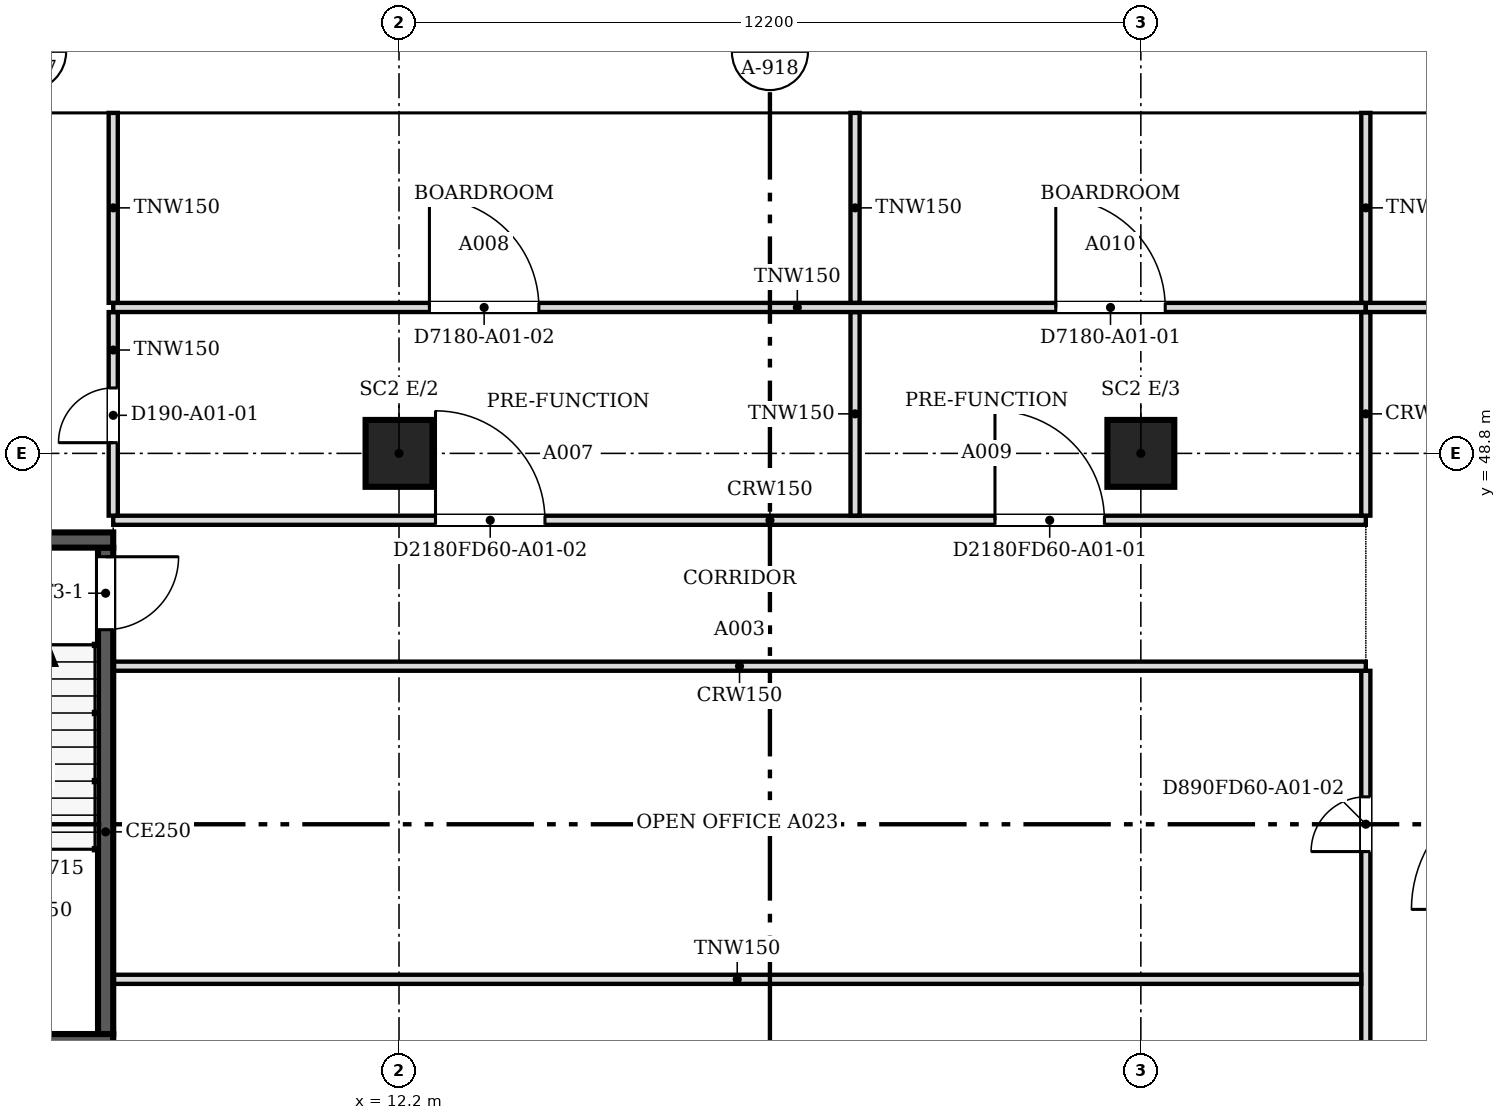
"""IFC4 building model, lengths in metres.
Left out: names, types, materials, properties, quantities, classifications, styles, units other than length and angle.
Written with IfcOpenShell. Run it as: python <this file> out.ifc"""

import sys

from ifc_helpers import new_model, si_unit, direction, frame, frame_2d, origin, origin_2d, place, context, subcontext, project, spatial, polyline, rectangle, outline, extrude, faceted_brep, source, transform, mapped, element, fill, save


model = new_model("IFC4")
c1 = context("Model", 3, precision=1e-05, world=origin(), true_north=direction((0.0, 1.0)))
c2 = subcontext(c1, "Body", "Model", "MODEL_VIEW")
j1 = project(units=[si_unit("LENGTHUNIT", "METRE"), si_unit("PLANEANGLEUNIT", "RADIAN")], contexts=[c1])
p1 = place(None, origin())
s1 = spatial("IfcSite", under=j1, at=p1, CompositionType="ELEMENT")
p2 = place(p1, origin())
s2 = spatial("IfcBuilding", under=s1, at=p2, CompositionType="ELEMENT")
p3 = place(p2, frame((0.0, 0.0, 21.3)))
s3 = spatial("IfcBuildingStorey", under=s2, at=p3, CompositionType="ELEMENT", Elevation=21.3)
for number, where, z_axis, x_axis in (
    (1, (12.2, 48.8, 0.0), (0.0, 0.0, 1.0), (1.0, 0.0, 0.0)),
    (2, (24.4, 48.8, 0.0), (0.0, 0.0, 1.0), (1.0, 0.0, 0.0)),
):
    element("IfcColumn", number, at=place(p3, frame(where, z_axis=z_axis, x_axis=x_axis)), inside=s3, PredefinedType="COLUMN", context=c2, shape_type="SweptSolid", body=[
        extrude(rectangle(XDim=1.1, YDim=1.1, at=origin_2d()), origin(), (0.0, 0.0, 1.0), 4.3),
    ])
m1 = source(origin(), c2, "Body", "SweptSolid", [
    extrude(outline(polyline([(3.05, 0.0), (6.1, 4.5), (3.05, 9.0), (0.0, 4.5), (3.05, 0.0)])), frame((0.0, 0.25, 0.0), z_axis=(0.0, -1.0, 0.0), x_axis=(1.0, 0.0, 0.0)), (0.0, 0.0, 1.0), 0.5),
])
p4 = place(p3, frame((30.5, 54.65, -4.5), z_axis=(0.0, 0.0, 1.0), x_axis=(-1.0, 0.0, 0.0)))
e3 = element("IfcWall", 3, at=p4, inside=s3, PredefinedType="SOLIDWALL", context=c2, shape_type="MappedRepresentation", body=[
    mapped(m1, transform((0.0, 0.0, 0.0), scale=1.0)),
])
m2 = source(origin(), c2, "Body", "SweptSolid", [
    extrude(outline(polyline([(3.05, 0.446), (5.798, 4.5), (3.05, 8.554), (0.302, 4.5), (3.05, 0.446)])), frame((0.0, 0.26, 0.0), z_axis=(0.0, -1.0, 0.0), x_axis=(1.0, 0.0, 0.0)), (0.0, 0.0, 1.0), 0.52),
])
p5 = place(p4, origin())
e4 = element("IfcOpeningElement", 4, at=p5, cuts=e3, PredefinedType="OPENING", context=c2, shape_type="MappedRepresentation", body=[
    mapped(m2, transform((0.0, 0.0, 0.0), scale=1.0)),
])
m3 = source(origin(), c2, "Body", "Brep", [
    faceted_brep([(3.05, -0.25, 0.0), (6.1, -0.25, 4.5), (6.1, -0.25, 4.5), (3.05, -0.25, 9.0), (0.0, -0.25, 4.5), (0.0, 0.25, 4.5), (3.05, 0.25, 9.0), (6.1, 0.25, 4.5), (6.1, 0.25, 4.5), (3.05, 0.25, 0.0)], [[[0, 1, 2, 3, 4]], [[5, 6, 7, 8, 9]], [[9, 8, 1, 0]], [[7, 6, 3, 2]], [[6, 5, 4, 3]], [[5, 9, 0, 4]], [[1, 8, 7, 2]]]),
])
p6 = place(p3, frame((24.4, 54.65, -4.5), z_axis=(0.0, 0.0, 1.0), x_axis=(-1.0, 0.0, 0.0)))
e5 = element("IfcWall", 5, at=p6, inside=s3, PredefinedType="SOLIDWALL", context=c2, shape_type="MappedRepresentation", body=[
    mapped(m3, transform((0.0, 0.0, 0.0), scale=1.0)),
])
p7 = place(p6, origin())
e6 = element("IfcOpeningElement", 6, at=p7, cuts=e5, PredefinedType="OPENING", context=c2, shape_type="MappedRepresentation", body=[
    mapped(m2, transform((0.0, 0.0, 0.0), scale=1.0)),
])
p8 = place(p3, frame((18.3, 54.65, -4.5), z_axis=(0.0, 0.0, 1.0), x_axis=(-1.0, 0.0, 0.0)))
e7 = element("IfcWall", 7, at=p8, inside=s3, PredefinedType="SOLIDWALL", context=c2, shape_type="MappedRepresentation", body=[
    mapped(m1, transform((0.0, 0.0, 0.0), scale=1.0)),
])
p9 = place(p8, origin())
e8 = element("IfcOpeningElement", 8, at=p9, cuts=e7, PredefinedType="OPENING", context=c2, shape_type="MappedRepresentation", body=[
    mapped(m2, transform((0.0, 0.0, 0.0), scale=1.0)),
])
m4 = source(origin(), c2, "Body", "Brep", [
    faceted_brep([(3.05, -0.25, 0.0), (6.053, -0.25, 4.5), (3.05, -0.25, 9.0), (0.0, -0.25, 4.5), (0.0, 0.25, 4.5), (3.05, 0.25, 9.0), (6.007, 0.25, 4.57), (6.007, 0.25, 4.43), (3.05, 0.25, 0.0), (6.053, 0.0, 4.5)], [[[0, 1, 2, 3]], [[4, 5, 6, 7, 8]], [[8, 7, 9, 1, 0]], [[6, 5, 2, 1, 9]], [[5, 4, 3, 2]], [[4, 8, 0, 3]], [[9, 7, 6]]]),
])
p10 = place(p3, frame((12.2, 54.65, -4.5), z_axis=(0.0, 0.0, 1.0), x_axis=(-1.0, 0.0, 0.0)))
e9 = element("IfcWall", 9, at=p10, inside=s3, PredefinedType="SOLIDWALL", context=c2, shape_type="MappedRepresentation", body=[
    mapped(m4, transform((0.0, 0.0, 0.0), scale=1.0)),
])
m5 = source(origin(), c2, "Body", "SweptSolid", [
    extrude(outline(polyline([(3.048, 0.448), (5.753, 4.5), (3.048, 8.552), (0.302, 4.5), (3.048, 0.448)])), frame((0.0, 0.26, 0.0), z_axis=(0.0, -1.0, 0.0), x_axis=(1.0, 0.0, 0.0)), (0.0, 0.0, 1.0), 0.52),
])
p11 = place(p10, origin())
e10 = element("IfcOpeningElement", 10, at=p11, cuts=e9, PredefinedType="OPENING", context=c2, shape_type="MappedRepresentation", body=[
    mapped(m5, transform((0.0, 0.0, 0.0), scale=1.0)),
])
m6 = source(origin(), c2, "Body", "SweptSolid", [
    extrude(outline(polyline([(3.05, 0.0), (6.1, 4.5), (0.0, 4.5), (3.05, 0.0)])), frame((0.0, 0.25, 0.0), z_axis=(0.0, -1.0, 0.0), x_axis=(1.0, 0.0, 0.0)), (0.0, 0.0, 1.0), 0.5),
])
p12 = place(p3, frame((33.55, 54.65, 0.0), z_axis=(0.0, 0.0, 1.0), x_axis=(-1.0, 0.0, 0.0)))
e11 = element("IfcWall", 11, at=p12, inside=s3, PredefinedType="SOLIDWALL", context=c2, shape_type="MappedRepresentation", body=[
    mapped(m6, transform((0.0, 0.0, 0.0), scale=1.0)),
])
m7 = source(origin(), c2, "Body", "SweptSolid", [
    extrude(outline(polyline([(3.05, 0.446), (5.629, 4.25), (0.471, 4.25), (3.05, 0.446)])), frame((0.0, 0.26, 0.0), z_axis=(0.0, -1.0, 0.0), x_axis=(1.0, 0.0, 0.0)), (0.0, 0.0, 1.0), 0.52),
])
p13 = place(p12, origin())
e12 = element("IfcOpeningElement", 12, at=p13, cuts=e11, PredefinedType="OPENING", context=c2, shape_type="MappedRepresentation", body=[
    mapped(m7, transform((0.0, 0.0, 0.0), scale=1.0)),
])
m8 = source(origin(), c2, "Body", "Brep", [
    faceted_brep([(3.05, -0.25, 0.0), (6.1, -0.25, 4.5), (6.1, -0.25, 4.5), (0.0, -0.25, 4.5), (0.0, 0.25, 4.5), (6.1, 0.25, 4.5), (6.1, 0.25, 4.5), (3.05, 0.25, 0.0)], [[[0, 1, 2, 3]], [[4, 5, 6, 7]], [[7, 6, 1, 0]], [[5, 4, 3, 2]], [[4, 7, 0, 3]], [[1, 6, 5, 2]]]),
])
p14 = place(p3, frame((27.45, 54.65, 0.0), z_axis=(0.0, 0.0, 1.0), x_axis=(-1.0, 0.0, 0.0)))
e13 = element("IfcWall", 13, at=p14, inside=s3, PredefinedType="SOLIDWALL", context=c2, shape_type="MappedRepresentation", body=[
    mapped(m8, transform((0.0, 0.0, 0.0), scale=1.0)),
])
p15 = place(p14, origin())
e14 = element("IfcOpeningElement", 14, at=p15, cuts=e13, PredefinedType="OPENING", context=c2, shape_type="MappedRepresentation", body=[
    mapped(m7, transform((0.0, 0.0, 0.0), scale=1.0)),
])
p16 = place(p3, frame((21.35, 54.65, 0.0), z_axis=(0.0, 0.0, 1.0), x_axis=(-1.0, 0.0, 0.0)))
e15 = element("IfcWall", 15, at=p16, inside=s3, PredefinedType="SOLIDWALL", context=c2, shape_type="MappedRepresentation", body=[
    mapped(m6, transform((0.0, 0.0, 0.0), scale=1.0)),
])
p17 = place(p16, origin())
e16 = element("IfcOpeningElement", 16, at=p17, cuts=e15, PredefinedType="OPENING", context=c2, shape_type="MappedRepresentation", body=[
    mapped(m7, transform((0.0, 0.0, 0.0), scale=1.0)),
])
p18 = place(p3, frame((15.25, 54.65, 0.0), z_axis=(0.0, 0.0, 1.0), x_axis=(-1.0, 0.0, 0.0)))
e17 = element("IfcWall", 17, at=p18, inside=s3, PredefinedType="SOLIDWALL", context=c2, shape_type="MappedRepresentation", body=[
    mapped(m6, transform((0.0, 0.0, 0.0), scale=1.0)),
])
p19 = place(p18, origin())
e18 = element("IfcOpeningElement", 18, at=p19, cuts=e17, PredefinedType="OPENING", context=c2, shape_type="MappedRepresentation", body=[
    mapped(m7, transform((0.0, 0.0, 0.0), scale=1.0)),
])
m9 = source(origin(), c2, "Body", "Brep", [
    faceted_brep([(3.003, -0.25, 0.0), (3.05, -0.25, 0.071), (3.05, -0.25, 4.5), (0.0, -0.25, 4.5), (0.0, 0.25, 4.5), (2.957, 0.25, 4.5), (2.957, 0.25, 0.07), (3.003, 0.0, 0.0)], [[[0, 1, 2, 3]], [[4, 5, 6]], [[1, 0, 7]], [[5, 4, 3, 2]], [[4, 6, 7, 0, 3]], [[1, 7, 6, 5, 2]]]),
])
p20 = place(p3, frame((9.15, 54.65, 0.0), z_axis=(0.0, 0.0, 1.0), x_axis=(-1.0, 0.0, 0.0)))
e19 = element("IfcWall", 19, at=p20, inside=s3, PredefinedType="SOLIDWALL", context=c2, shape_type="MappedRepresentation", body=[
    mapped(m9, transform((0.0, 0.0, 0.0), scale=1.0)),
])
m10 = source(origin(), c2, "Body", "SweptSolid", [
    extrude(outline(polyline([(2.803, 4.25), (0.468, 4.25), (2.803, 0.75), (2.803, 4.25)])), frame((0.0, 0.26, 0.0), z_axis=(0.0, -1.0, 0.0), x_axis=(1.0, 0.0, 0.0)), (0.0, 0.0, 1.0), 0.52),
])
p21 = place(p20, origin())
e20 = element("IfcOpeningElement", 20, at=p21, cuts=e19, PredefinedType="OPENING", context=c2, shape_type="MappedRepresentation", body=[
    mapped(m10, transform((0.0, 0.0, 0.0), scale=1.0)),
])
for number, where, z_axis, x_axis in (
    (21, (7.5, 39.125, 0.0), (0.0, 0.0, 1.0), (-1.0, 0.0, 0.0)),
    (22, (3.6, 47.375, 0.0), (0.0, 0.0, 1.0), (1.0, 0.0, 0.0)),
):
    element("IfcWall", number, at=place(p3, frame(where, z_axis=z_axis, x_axis=x_axis)), inside=s3, PredefinedType="SOLIDWALL", context=c2, shape_type="SweptSolid", body=[
        extrude(rectangle(XDim=3.9, YDim=0.25, at=frame_2d((1.95, 0.0))), origin(), (0.0, 0.0, 1.0), 4.5),
    ])
p22 = place(p3, frame((7.375, 47.25, 0.0), z_axis=(0.0, 0.0, 1.0), x_axis=(0.0, -1.0, 0.0)))
e23 = element("IfcWall", 23, at=p22, inside=s3, PredefinedType="SOLIDWALL", context=c2, shape_type="SweptSolid", body=[
    extrude(rectangle(XDim=8.0, YDim=0.25, at=frame_2d((4.0, 0.0))), origin(), (0.0, 0.0, 1.0), 4.5),
])
m11 = source(origin(), c2, "Body", "SweptSolid", [
    extrude(rectangle(XDim=1.2, YDim=2.1, at=frame_2d((0.6, 1.05))), frame((0.0, 0.135, 0.0), z_axis=(0.0, -1.0, 0.0), x_axis=(1.0, 0.0, 0.0)), (0.0, 0.0, 1.0), 0.27),
])
p23 = place(p22, frame((0.15, 0.0, 0.0)))
e24 = element("IfcOpeningElement", 24, at=p23, cuts=e23, PredefinedType="OPENING", context=c2, shape_type="MappedRepresentation", body=[
    mapped(m11, transform((0.0, 0.0, 0.0), scale=1.0)),
])
p24 = place(p3, frame((28.1, 18.8, 0.0), z_axis=(0.0, 0.0, 1.0), x_axis=(0.0, 1.0, 0.0)))
e25 = element("IfcWall", 25, at=p24, inside=s3, PredefinedType="PARTITIONING", context=c2, shape_type="SweptSolid", body=[
    extrude(rectangle(XDim=26.424, YDim=0.15, at=frame_2d((13.212, 0.0))), origin(), (0.0, 0.0, 1.0), 3.767),
])
m12 = source(origin(), c2, "Body", "SweptSolid", [
    extrude(rectangle(XDim=0.9, YDim=2.1, at=frame_2d((0.45, 1.05))), frame((0.0, 0.085, 0.0), z_axis=(0.0, -1.0, 0.0), x_axis=(1.0, 0.0, 0.0)), (0.0, 0.0, 1.0), 0.17),
])
p25 = place(p24, frame((3.901, 0.0, 0.0)))
e26 = element("IfcOpeningElement", 26, at=p25, cuts=e25, PredefinedType="OPENING", context=c2, shape_type="MappedRepresentation", body=[
    mapped(m12, transform((0.0, 0.0, 0.0), scale=1.0)),
])
p26 = place(p24, frame((23.451, 0.0, 0.0)))
e27 = element("IfcOpeningElement", 27, at=p26, cuts=e25, PredefinedType="OPENING", context=c2, shape_type="MappedRepresentation", body=[
    mapped(m12, transform((0.0, 0.0, 0.0), scale=1.0)),
])
m13 = source(origin(), c2, "Body", "SweptSolid", [
    extrude(rectangle(XDim=1.0, YDim=2.1, at=frame_2d((0.5, 1.05))), frame((0.0, 0.085, 0.0), z_axis=(0.0, -1.0, 0.0), x_axis=(1.0, 0.0, 0.0)), (0.0, 0.0, 1.0), 0.17),
])
p27 = place(p24, frame((8.4, 0.0, 0.0)))
e28 = element("IfcOpeningElement", 28, at=p27, cuts=e25, PredefinedType="OPENING", context=c2, shape_type="MappedRepresentation", body=[
    mapped(m13, transform((0.0, 0.0, 0.0), scale=1.0)),
])
p28 = place(p24, frame((16.3, 0.0, 0.0)))
e29 = element("IfcOpeningElement", 29, at=p28, cuts=e25, PredefinedType="OPENING", context=c2, shape_type="MappedRepresentation", body=[
    mapped(m12, transform((0.0, 0.0, 0.0), scale=1.0)),
])
p29 = place(p3, frame((7.5, 40.15, 0.0), z_axis=(0.0, 0.0, 1.0), x_axis=(1.0, 0.0, 0.0)))
e30 = element("IfcWall", 30, at=p29, inside=s3, PredefinedType="PARTITIONING", context=c2, shape_type="SweptSolid", body=[
    extrude(rectangle(XDim=20.524, YDim=0.15, at=frame_2d((10.262, 0.0))), origin(), (0.0, 0.0, 1.0), 3.767),
])
p30 = place(p3, frame((7.5, 45.3, 0.0), z_axis=(0.0, 0.0, 1.0), x_axis=(1.0, 0.0, 0.0)))
e31 = element("IfcWall", 31, at=p30, inside=s3, PredefinedType="PARTITIONING", context=c2, shape_type="SweptSolid", body=[
    extrude(rectangle(XDim=20.6, YDim=0.15, at=frame_2d((10.3, 0.0))), origin(), (0.0, 0.0, 1.0), 3.767),
])
p31 = place(p3, frame((7.5, 47.7, 0.0), z_axis=(0.0, 0.0, 1.0), x_axis=(1.0, 0.0, 0.0)))
e32 = element("IfcWall", 32, at=p31, inside=s3, PredefinedType="PARTITIONING", context=c2, shape_type="SweptSolid", body=[
    extrude(rectangle(XDim=20.6, YDim=0.15, at=frame_2d((10.3, 0.0))), origin(), (0.0, 0.0, 1.0), 3.767),
])
m14 = source(origin(), c2, "Body", "SweptSolid", [
    extrude(rectangle(XDim=1.8, YDim=2.1, at=frame_2d((0.9, 1.05))), frame((0.0, 0.085, 0.0), z_axis=(0.0, -1.0, 0.0), x_axis=(1.0, 0.0, 0.0)), (0.0, 0.0, 1.0), 0.17),
])
p32 = place(p31, frame((14.501, 0.0, 0.0)))
e33 = element("IfcOpeningElement", 33, at=p32, cuts=e32, PredefinedType="OPENING", context=c2, shape_type="MappedRepresentation", body=[
    mapped(m14, transform((0.0, 0.0, 0.0), scale=1.0)),
])
p33 = place(p31, frame((5.3, 0.0, 0.0)))
e34 = element("IfcOpeningElement", 34, at=p33, cuts=e32, PredefinedType="OPENING", context=c2, shape_type="MappedRepresentation", body=[
    mapped(m14, transform((0.0, 0.0, 0.0), scale=1.0)),
])
p34 = place(p3, frame((7.5, 47.776, 0.0), z_axis=(0.0, 0.0, 1.0), x_axis=(0.0, 1.0, 0.0)))
e35 = element("IfcWall", 35, at=p34, inside=s3, PredefinedType="PARTITIONING", context=c2, shape_type="SweptSolid", body=[
    extrude(rectangle(XDim=3.348, YDim=0.15, at=frame_2d((1.674, 0.0))), origin(), (0.0, 0.0, 1.0), 3.767),
])
p35 = place(p34, frame((1.2, 0.0, 0.0)))
e36 = element("IfcOpeningElement", 36, at=p35, cuts=e35, PredefinedType="OPENING", context=c2, shape_type="MappedRepresentation", body=[
    mapped(m12, transform((0.0, 0.0, 0.0), scale=1.0)),
])
for number, where, z_axis, x_axis in (
    (37, (19.7, 47.776, 0.0), (0.0, 0.0, 1.0), (0.0, 1.0, 0.0)),
    (38, (28.1, 47.776, 0.0), (0.0, 0.0, 1.0), (0.0, 1.0, 0.0)),
):
    element("IfcWall", number, at=place(p3, frame(where, z_axis=z_axis, x_axis=x_axis)), inside=s3, PredefinedType="PARTITIONING", context=c2, shape_type="SweptSolid", body=[
        extrude(rectangle(XDim=3.348, YDim=0.15, at=frame_2d((1.674, 0.0))), origin(), (0.0, 0.0, 1.0), 3.767),
    ])
p36 = place(p3, frame((7.5, 51.2, 0.0), z_axis=(0.0, 0.0, 1.0), x_axis=(1.0, 0.0, 0.0)))
e39 = element("IfcWall", 39, at=p36, inside=s3, PredefinedType="PARTITIONING", context=c2, shape_type="SweptSolid", body=[
    extrude(rectangle(XDim=20.599, YDim=0.15, at=frame_2d((10.3, 0.0))), origin(), (0.0, 0.0, 1.0), 3.767),
])
p37 = place(p36, frame((15.501, 0.0, 0.0)))
e40 = element("IfcOpeningElement", 40, at=p37, cuts=e39, PredefinedType="OPENING", context=c2, shape_type="MappedRepresentation", body=[
    mapped(m14, transform((0.0, 0.0, 0.0), scale=1.0)),
])
p38 = place(p36, frame((5.2, 0.0, 0.0)))
e41 = element("IfcOpeningElement", 41, at=p38, cuts=e39, PredefinedType="OPENING", context=c2, shape_type="MappedRepresentation", body=[
    mapped(m14, transform((0.0, 0.0, 0.0), scale=1.0)),
])
p39 = place(p3, frame((28.1, 51.2, 0.0), z_axis=(0.0, 0.0, 1.0), x_axis=(1.0, 0.0, 0.0)))
e42 = element("IfcWall", 42, at=p39, inside=s3, PredefinedType="PARTITIONING", context=c2, shape_type="SweptSolid", body=[
    extrude(rectangle(XDim=31.438, YDim=0.15, at=frame_2d((15.719, 0.0))), origin(), (0.0, 0.0, 1.0), 3.767),
])
p40 = place(p39, frame((16.301, 0.0, 0.0)))
e43 = element("IfcOpeningElement", 43, at=p40, cuts=e42, PredefinedType="OPENING", context=c2, shape_type="MappedRepresentation", body=[
    mapped(m12, transform((0.0, 0.0, 0.0), scale=1.0)),
])
p41 = place(p39, frame((25.95, 0.0, 0.0)))
e44 = element("IfcOpeningElement", 44, at=p41, cuts=e42, PredefinedType="OPENING", context=c2, shape_type="MappedRepresentation", body=[
    mapped(m12, transform((0.0, 0.0, 0.0), scale=1.0)),
])
p42 = place(p39, frame((5.6, 0.0, 0.0)))
e45 = element("IfcOpeningElement", 45, at=p42, cuts=e42, PredefinedType="OPENING", context=c2, shape_type="MappedRepresentation", body=[
    mapped(m12, transform((0.0, 0.0, 0.0), scale=1.0)),
])
for number, where, z_axis, x_axis in (
    (46, (7.5, 51.276, 0.0), (0.0, 0.0, 1.0), (0.0, 1.0, 0.0)),
    (47, (19.7, 51.276, 0.0), (0.0, 0.0, 1.0), (0.0, 1.0, 0.0)),
    (48, (28.1, 51.276, 0.0), (0.0, 0.0, 1.0), (0.0, 1.0, 0.0)),
):
    element("IfcWall", number, at=place(p3, frame(where, z_axis=z_axis, x_axis=x_axis)), inside=s3, PredefinedType="PARTITIONING", context=c2, shape_type="SweptSolid", body=[
        extrude(rectangle(XDim=3.124, YDim=0.15, at=frame_2d((1.562, 0.0))), origin(), (0.0, 0.0, 1.0), 3.767),
    ])
m15 = source(origin(), c2, "Body", "SweptSolid", [
    extrude(rectangle(XDim=1.2, YDim=2.1, at=frame_2d((0.6, 1.05))), frame((0.0, 0.025, 0.0), z_axis=(0.0, -1.0, 0.0), x_axis=(1.0, 0.0, 0.0)), (0.0, 0.0, 1.0), 0.05),
])
p43 = place(p23, origin())
e49 = element("IfcDoor", 49, at=p43, inside=s3, OperationType="SINGLE_SWING_LEFT", PredefinedType="DOOR", context=c2, shape_type="MappedRepresentation", body=[
    mapped(m15, transform((0.0, 0.0, 0.0), scale=1.0)),
])
fill(e24, e49)
m16 = source(origin(), c2, "Body", "SweptSolid", [
    extrude(rectangle(XDim=0.9, YDim=2.1, at=frame_2d((0.45, 1.05))), frame((0.0, 0.025, 0.0), z_axis=(0.0, -1.0, 0.0), x_axis=(1.0, 0.0, 0.0)), (0.0, 0.0, 1.0), 0.05),
])
p44 = place(p35, origin())
e50 = element("IfcDoor", 50, at=p44, inside=s3, OperationType="SINGLE_SWING_LEFT", PredefinedType="DOOR", context=c2, shape_type="MappedRepresentation", body=[
    mapped(m16, transform((0.0, 0.0, 0.0), scale=1.0)),
])
fill(e36, e50)
p45 = place(p26, origin())
e51 = element("IfcDoor", 51, at=p45, inside=s3, OperationType="SINGLE_SWING_LEFT", PredefinedType="DOOR", context=c2, shape_type="MappedRepresentation", body=[
    mapped(m16, transform((0.0, 0.0, 0.0), scale=1.0)),
])
fill(e27, e51)
m17 = source(origin(), c2, "Body", "SweptSolid", [
    extrude(rectangle(XDim=1.8, YDim=2.1, at=frame_2d((0.9, 1.05))), frame((0.0, 0.025, 0.0), z_axis=(0.0, -1.0, 0.0), x_axis=(1.0, 0.0, 0.0)), (0.0, 0.0, 1.0), 0.05),
])
p46 = place(p37, origin())
e52 = element("IfcDoor", 52, at=p46, inside=s3, OperationType="DOUBLE_DOOR_SINGLE_SWING", PredefinedType="DOOR", context=c2, shape_type="MappedRepresentation", body=[
    mapped(m17, transform((0.0, 0.0, 0.0), scale=1.0)),
])
fill(e40, e52)
p47 = place(p32, origin())
e53 = element("IfcDoor", 53, at=p47, inside=s3, OperationType="DOUBLE_DOOR_SINGLE_SWING", PredefinedType="DOOR", context=c2, shape_type="MappedRepresentation", body=[
    mapped(m17, transform((0.0, 0.0, 0.0), scale=1.0)),
])
fill(e33, e53)
p48 = place(p33, origin())
e54 = element("IfcDoor", 54, at=p48, inside=s3, OperationType="DOUBLE_DOOR_SINGLE_SWING", PredefinedType="DOOR", context=c2, shape_type="MappedRepresentation", body=[
    mapped(m17, transform((0.0, 0.0, 0.0), scale=1.0)),
])
fill(e34, e54)
p49 = place(p38, origin())
e55 = element("IfcDoor", 55, at=p49, inside=s3, OperationType="DOUBLE_DOOR_SINGLE_SWING", PredefinedType="DOOR", context=c2, shape_type="MappedRepresentation", body=[
    mapped(m17, transform((0.0, 0.0, 0.0), scale=1.0)),
])
fill(e41, e55)
save(model, sys.argv[1])
